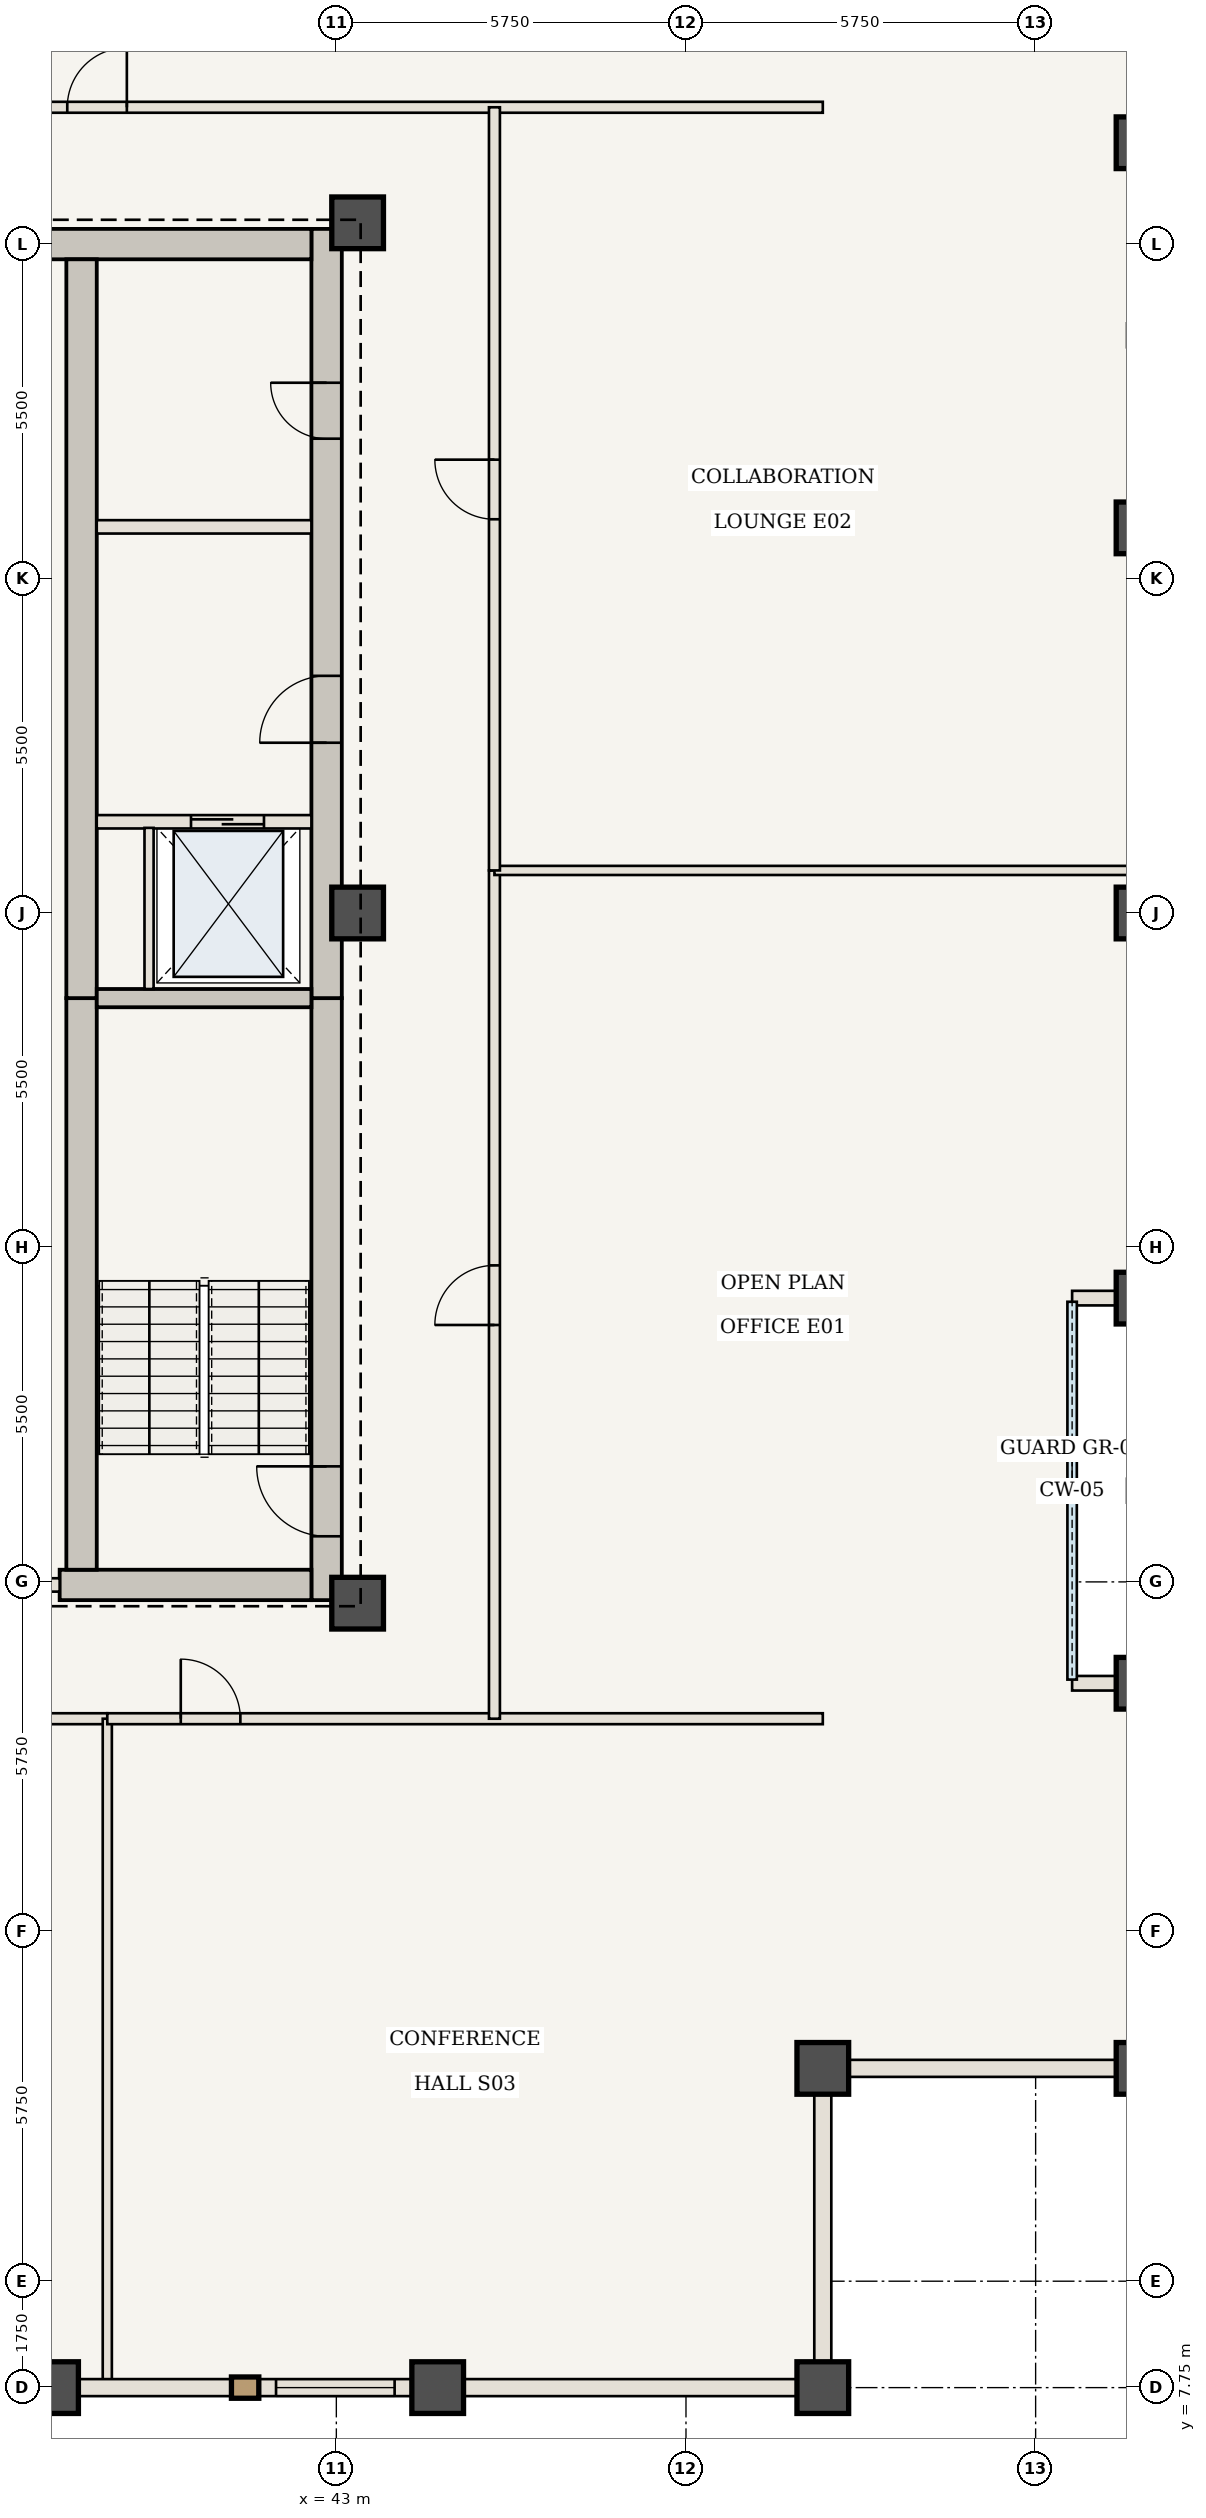
"""IFC4 building model, lengths in metres.
Left out: names, types, materials, properties, quantities, classifications, styles, units other than length and angle.
Written with IfcOpenShell. Run it as: python <this file> out.ifc"""

import sys

from ifc_helpers import new_model, si_unit, direction, frame, frame_2d, origin, origin_2d, place, context, subcontext, project, spatial, rectangle, extrude, element, fill, save


model = new_model("IFC4")
c1 = context("Model", 3, precision=1e-05, world=origin(), true_north=direction((0.0, 1.0)))
c2 = subcontext(c1, "Body", "Model", "MODEL_VIEW")
j1 = project(units=[si_unit("LENGTHUNIT", "METRE"), si_unit("PLANEANGLEUNIT", "RADIAN")], contexts=[c1])
p1 = place(None, origin())
s1 = spatial("IfcSite", under=j1, at=p1, CompositionType="ELEMENT")
p2 = place(p1, origin())
s2 = spatial("IfcBuilding", under=s1, at=p2, CompositionType="ELEMENT")
p3 = place(p2, frame((0.0, 0.0, 240.8)))
s3 = spatial("IfcBuildingStorey", under=s2, at=p3, CompositionType="ELEMENT", Elevation=240.8)
p4 = place(p3, frame((42.84, 20.7, 0.0), z_axis=(0.0, 0.0, 1.0), x_axis=(0.0, 1.0, 0.0)))
e1 = element("IfcWall", 1, at=p4, inside=s3, PredefinedType="SHEAR", context=c2, shape_type="SweptSolid", body=[
    extrude(rectangle(XDim=9.9, YDim=0.5, at=frame_2d((4.95, 0.0))), origin(), (0.0, 0.0, 1.0), 3.85),
])
p5 = place(p4, frame((1.05, 0.0, 0.0)))
e2 = element("IfcOpeningElement", 2, at=p5, cuts=e1, PredefinedType="OPENING", context=c2, shape_type="SweptSolid", body=[
    extrude(rectangle(XDim=1.15, YDim=2.15, at=frame_2d((0.575, 1.075))), frame((0.0, 0.26, 0.0), z_axis=(0.0, -1.0, 0.0), x_axis=(1.0, 0.0, 0.0)), (0.0, 0.0, 1.0), 0.52),
])
p6 = place(p3, frame((42.84, 30.6, 0.0), z_axis=(0.0, 0.0, 1.0), x_axis=(0.0, 1.0, 0.0)))
e3 = element("IfcWall", 3, at=p6, inside=s3, PredefinedType="SHEAR", context=c2, shape_type="SweptSolid", body=[
    extrude(rectangle(XDim=12.65, YDim=0.5, at=frame_2d((6.325, 0.0))), origin(), (0.0, 0.0, 1.0), 3.85),
])
p7 = place(p6, frame((4.2, 0.0, 0.0)))
e4 = element("IfcOpeningElement", 4, at=p7, cuts=e3, PredefinedType="OPENING", context=c2, shape_type="SweptSolid", body=[
    extrude(rectangle(XDim=1.1, YDim=2.15, at=frame_2d((0.55, 1.075))), frame((0.0, 0.26, 0.0), z_axis=(0.0, -1.0, 0.0), x_axis=(1.0, 0.0, 0.0)), (0.0, 0.0, 1.0), 0.52),
])
p8 = place(p6, frame((9.2, 0.0, 0.0)))
e5 = element("IfcOpeningElement", 5, at=p8, cuts=e3, PredefinedType="OPENING", context=c2, shape_type="SweptSolid", body=[
    extrude(rectangle(XDim=0.92, YDim=2.1, at=frame_2d((0.46, 1.05))), frame((0.0, 0.26, 0.0), z_axis=(0.0, -1.0, 0.0), x_axis=(1.0, 0.0, 0.0)), (0.0, 0.0, 1.0), 0.52),
])
p9 = place(p3, frame((38.45, 20.95, 0.0), z_axis=(0.0, 0.0, 1.0), x_axis=(1.0, 0.0, 0.0)))
e6 = element("IfcWall", 6, at=p9, inside=s3, PredefinedType="SHEAR", context=c2, shape_type="SweptSolid", body=[
    extrude(rectangle(XDim=4.14, YDim=0.5, at=frame_2d((2.07, 0.0))), origin(), (0.0, 0.0, 1.0), 3.85),
])
p10 = place(p3, frame((37.75, 43.0, 0.0), z_axis=(0.0, 0.0, 1.0), x_axis=(1.0, 0.0, 0.0)))
e7 = element("IfcWall", 7, at=p10, inside=s3, PredefinedType="SHEAR", context=c2, shape_type="SweptSolid", body=[
    extrude(rectangle(XDim=4.84, YDim=0.5, at=frame_2d((2.42, 0.0))), origin(), (0.0, 0.0, 1.0), 3.85),
])
p11 = place(p3, frame((38.81, 21.2, 0.0), z_axis=(0.0, 0.0, 1.0), x_axis=(0.0, 1.0, 0.0)))
e8 = element("IfcWall", 8, at=p11, inside=s3, PredefinedType="SHEAR", context=c2, shape_type="SweptSolid", body=[
    extrude(rectangle(XDim=9.4, YDim=0.5, at=frame_2d((4.7, 0.0))), origin(), (0.0, 0.0, 1.0), 3.85),
])
p12 = place(p3, frame((38.81, 30.6, 0.0), z_axis=(0.0, 0.0, 1.0), x_axis=(0.0, 1.0, 0.0)))
e9 = element("IfcWall", 9, at=p12, inside=s3, PredefinedType="SHEAR", context=c2, shape_type="SweptSolid", body=[
    extrude(rectangle(XDim=12.15, YDim=0.5, at=frame_2d((6.075, 0.0))), origin(), (0.0, 0.0, 1.0), 3.85),
])
for number, where, z_axis, x_axis in (
    (10, (43.35, 20.65, 0.0), (0.0, 0.0, 1.0), (1.0, 0.0, 0.0)),
    (11, (43.35, 32.0, 0.0), (0.0, 0.0, 1.0), (1.0, 0.0, 0.0)),
    (12, (43.35, 43.35, 0.0), (0.0, 0.0, 1.0), (1.0, 0.0, 0.0)),
    (13, (51.0, 7.75, 0.0), (0.0, 0.0, 1.0), (1.0, 0.0, 0.0)),
    (14, (51.0, 13.0, 0.0), (0.0, 0.0, 1.0), (1.0, 0.0, 0.0)),
    (15, (56.25, 13.0, 0.0), (0.0, 0.0, 1.0), (1.0, 0.0, 0.0)),
    (16, (56.25, 19.333, 0.0), (0.0, 0.0, 1.0), (1.0, 0.0, 0.0)),
    (17, (56.25, 25.667, 0.0), (0.0, 0.0, 1.0), (1.0, 0.0, 0.0)),
    (18, (56.25, 32.0, 0.0), (0.0, 0.0, 1.0), (1.0, 0.0, 0.0)),
    (19, (38.333, 7.75, 0.0), (0.0, 0.0, 1.0), (1.0, 0.0, 0.0)),
    (20, (56.25, 38.333, 0.0), (0.0, 0.0, 1.0), (1.0, 0.0, 0.0)),
    (21, (44.667, 7.75, 0.0), (0.0, 0.0, 1.0), (1.0, 0.0, 0.0)),
    (22, (56.25, 44.667, 0.0), (0.0, 0.0, 1.0), (1.0, 0.0, 0.0)),
):
    element("IfcColumn", number, at=place(p3, frame(where, z_axis=z_axis, x_axis=x_axis)), inside=s3, PredefinedType="COLUMN", context=c2, shape_type="SweptSolid", body=[
        extrude(rectangle(XDim=0.85, YDim=0.85, at=origin_2d()), origin(), (0.0, 0.0, 1.0), 3.85),
    ])
p13 = place(p3, frame((39.06, 30.6, 0.0), z_axis=(0.0, 0.0, 1.0), x_axis=(1.0, 0.0, 0.0)))
e23 = element("IfcWall", 23, at=p13, inside=s3, PredefinedType="SHEAR", context=c2, shape_type="SweptSolid", body=[
    extrude(rectangle(XDim=3.53, YDim=0.3, at=frame_2d((1.765, 0.0))), origin(), (0.0, 0.0, 1.0), 3.685),
])
p14 = place(p3, frame((39.06, 33.5, 0.0), z_axis=(0.0, 0.0, 1.0), x_axis=(1.0, 0.0, 0.0)))
e24 = element("IfcWall", 24, at=p14, inside=s3, PredefinedType="STANDARD", context=c2, shape_type="SweptSolid", body=[
    extrude(rectangle(XDim=3.53, YDim=0.22, at=frame_2d((1.765, 0.0))), origin(), (0.0, 0.0, 1.0), 3.685),
])
p15 = place(p14, frame((1.55, 0.0, 0.0)))
e25 = element("IfcOpeningElement", 25, at=p15, cuts=e24, PredefinedType="OPENING", context=c2, shape_type="SweptSolid", body=[
    extrude(rectangle(XDim=1.2, YDim=2.2, at=frame_2d((0.6, 1.1))), frame((0.0, 0.12, 0.0), z_axis=(0.0, -1.0, 0.0), x_axis=(1.0, 0.0, 0.0)), (0.0, 0.0, 1.0), 0.24),
])
p16 = place(p3, frame((39.92, 30.75, 0.0), z_axis=(0.0, 0.0, 1.0), x_axis=(0.0, 1.0, 0.0)))
e26 = element("IfcWall", 26, at=p16, inside=s3, PredefinedType="STANDARD", context=c2, shape_type="SweptSolid", body=[
    extrude(rectangle(XDim=2.65, YDim=0.15, at=frame_2d((1.325, 0.0))), origin(), (0.0, 0.0, 1.0), 3.685),
])
p17 = place(p3, frame((39.06, 38.35, 0.0), z_axis=(0.0, 0.0, 1.0), x_axis=(1.0, 0.0, 0.0)))
e27 = element("IfcWall", 27, at=p17, inside=s3, PredefinedType="STANDARD", context=c2, shape_type="SweptSolid", body=[
    extrude(rectangle(XDim=3.53, YDim=0.22, at=frame_2d((1.765, 0.0))), origin(), (0.0, 0.0, 1.0), 3.685),
])
p18 = place(p3, frame((35.15, 20.95, 0.0), z_axis=(0.0, 0.0, 1.0), x_axis=(1.0, 0.0, 0.0)))
e28 = element("IfcWall", 28, at=p18, inside=s3, PredefinedType="STANDARD", context=c2, shape_type="SweptSolid", body=[
    extrude(rectangle(XDim=3.3, YDim=0.22, at=frame_2d((1.65, 0.0))), origin(), (0.0, 0.0, 1.0), 3.685),
])
p19 = place(p18, frame((1.1, 0.0, 0.0)))
e29 = element("IfcOpeningElement", 29, at=p19, cuts=e28, PredefinedType="OPENING", context=c2, shape_type="SweptSolid", body=[
    extrude(rectangle(XDim=1.1, YDim=2.15, at=frame_2d((0.55, 1.075))), frame((0.0, 0.12, 0.0), z_axis=(0.0, -1.0, 0.0), x_axis=(1.0, 0.0, 0.0)), (0.0, 0.0, 1.0), 0.24),
])
p20 = place(p3, frame((24.867, 18.75, 0.0), z_axis=(0.0, 0.0, 1.0), x_axis=(1.0, 0.0, 0.0)))
e30 = element("IfcWall", 30, at=p20, inside=s3, PredefinedType="STANDARD", context=c2, shape_type="SweptSolid", body=[
    extrude(rectangle(XDim=14.367, YDim=0.18, at=frame_2d((7.183, 0.0))), origin(), (0.0, 0.0, 1.0), 3.685),
])
p21 = place(p20, frame((8.133, 0.0, 0.0)))
e31 = element("IfcOpeningElement", 31, at=p21, cuts=e30, PredefinedType="OPENING", context=c2, shape_type="SweptSolid", body=[
    extrude(rectangle(XDim=0.98, YDim=2.2, at=frame_2d((0.49, 1.1))), frame((0.0, 0.1, 0.0), z_axis=(0.0, -1.0, 0.0), x_axis=(1.0, 0.0, 0.0)), (0.0, 0.0, 1.0), 0.2),
])
p22 = place(p3, frame((39.233, 7.81, 0.0), z_axis=(0.0, 0.0, 1.0), x_axis=(0.0, 1.0, 0.0)))
e32 = element("IfcWall", 32, at=p22, inside=s3, PredefinedType="STANDARD", context=c2, shape_type="SweptSolid", body=[
    extrude(rectangle(XDim=10.94, YDim=0.15, at=frame_2d((5.47, 0.0))), origin(), (0.0, 0.0, 1.0), 3.685),
])
p23 = place(p3, frame((39.233, 18.75, 0.0), z_axis=(0.0, 0.0, 1.0), x_axis=(1.0, 0.0, 0.0)))
e33 = element("IfcWall", 33, at=p23, inside=s3, PredefinedType="STANDARD", context=c2, shape_type="SweptSolid", body=[
    extrude(rectangle(XDim=11.767, YDim=0.18, at=frame_2d((5.883, 0.0))), origin(), (0.0, 0.0, 1.0), 3.685),
])
p24 = place(p23, frame((1.208, 0.0, 0.0)))
e34 = element("IfcOpeningElement", 34, at=p24, cuts=e33, PredefinedType="OPENING", context=c2, shape_type="SweptSolid", body=[
    extrude(rectangle(XDim=0.98, YDim=2.2, at=frame_2d((0.49, 1.1))), frame((0.0, 0.1, 0.0), z_axis=(0.0, -1.0, 0.0), x_axis=(1.0, 0.0, 0.0)), (0.0, 0.0, 1.0), 0.2),
])
p25 = place(p3, frame((32.6, 45.25, 0.0), z_axis=(0.0, 0.0, 1.0), x_axis=(1.0, 0.0, 0.0)))
e35 = element("IfcWall", 35, at=p25, inside=s3, PredefinedType="STANDARD", context=c2, shape_type="SweptSolid", body=[
    extrude(rectangle(XDim=18.4, YDim=0.18, at=frame_2d((9.2, 0.0))), origin(), (0.0, 0.0, 1.0), 3.685),
])
p26 = place(p25, frame((5.975, 0.0, 0.0)))
e36 = element("IfcOpeningElement", 36, at=p26, cuts=e35, PredefinedType="OPENING", context=c2, shape_type="SweptSolid", body=[
    extrude(rectangle(XDim=0.98, YDim=2.2, at=frame_2d((0.49, 1.1))), frame((0.0, 0.1, 0.0), z_axis=(0.0, -1.0, 0.0), x_axis=(1.0, 0.0, 0.0)), (0.0, 0.0, 1.0), 0.2),
])
p27 = place(p3, frame((45.6, 18.75, 0.0), z_axis=(0.0, 0.0, 1.0), x_axis=(0.0, 1.0, 0.0)))
e37 = element("IfcWall", 37, at=p27, inside=s3, PredefinedType="STANDARD", context=c2, shape_type="SweptSolid", body=[
    extrude(rectangle(XDim=13.95, YDim=0.18, at=frame_2d((6.975, 0.0))), origin(), (0.0, 0.0, 1.0), 3.685),
])
p28 = place(p27, frame((6.475, 0.0, 0.0)))
e38 = element("IfcOpeningElement", 38, at=p28, cuts=e37, PredefinedType="OPENING", context=c2, shape_type="SweptSolid", body=[
    extrude(rectangle(XDim=0.98, YDim=2.2, at=frame_2d((0.49, 1.1))), frame((0.0, 0.1, 0.0), z_axis=(0.0, -1.0, 0.0), x_axis=(1.0, 0.0, 0.0)), (0.0, 0.0, 1.0), 0.2),
])
p29 = place(p3, frame((45.6, 32.7, 0.0), z_axis=(0.0, 0.0, 1.0), x_axis=(1.0, 0.0, 0.0)))
e39 = element("IfcWall", 39, at=p29, inside=s3, PredefinedType="STANDARD", context=c2, shape_type="SweptSolid", body=[
    extrude(rectangle(XDim=10.59, YDim=0.15, at=frame_2d((5.295, 0.0))), origin(), (0.0, 0.0, 1.0), 3.685),
])
p30 = place(p3, frame((45.6, 32.7, 0.0), z_axis=(0.0, 0.0, 1.0), x_axis=(0.0, 1.0, 0.0)))
e40 = element("IfcWall", 40, at=p30, inside=s3, PredefinedType="STANDARD", context=c2, shape_type="SweptSolid", body=[
    extrude(rectangle(XDim=12.55, YDim=0.18, at=frame_2d((6.275, 0.0))), origin(), (0.0, 0.0, 1.0), 3.685),
])
p31 = place(p30, frame((5.775, 0.0, 0.0)))
e41 = element("IfcOpeningElement", 41, at=p31, cuts=e40, PredefinedType="OPENING", context=c2, shape_type="SweptSolid", body=[
    extrude(rectangle(XDim=0.98, YDim=2.2, at=frame_2d((0.49, 1.1))), frame((0.0, 0.1, 0.0), z_axis=(0.0, -1.0, 0.0), x_axis=(1.0, 0.0, 0.0)), (0.0, 0.0, 1.0), 0.2),
])
p32 = place(p3, frame((38.333, 7.75, 0.0), z_axis=(0.0, 0.0, 1.0), x_axis=(-1.0, 0.0, 0.0)))
e42 = element("IfcWall", 42, at=p32, inside=s3, PredefinedType="USERDEFINED", context=c2, shape_type="SweptSolid", body=[
    extrude(rectangle(XDim=6.333, YDim=0.28, at=frame_2d((3.167, 0.0))), origin(), (0.0, 0.0, 1.0), 2.985),
])
p33 = place(p32, frame((1.817, 0.0, 0.85)))
e43 = element("IfcOpeningElement", 43, at=p33, cuts=e42, PredefinedType="OPENING", context=c2, shape_type="SweptSolid", body=[
    extrude(rectangle(XDim=2.7, YDim=1.935, at=frame_2d((1.35, 0.968))), frame((0.0, 0.15, 0.0), z_axis=(0.0, -1.0, 0.0), x_axis=(1.0, 0.0, 0.0)), (0.0, 0.0, 1.0), 0.3),
])
p34 = place(p3, frame((44.667, 7.75, 0.0), z_axis=(0.0, 0.0, 1.0), x_axis=(-1.0, 0.0, 0.0)))
e44 = element("IfcWall", 44, at=p34, inside=s3, PredefinedType="USERDEFINED", context=c2, shape_type="SweptSolid", body=[
    extrude(rectangle(XDim=6.333, YDim=0.28, at=frame_2d((3.167, 0.0))), origin(), (0.0, 0.0, 1.0), 2.985),
])
p35 = place(p34, frame((0.708, 0.0, 0.85)))
e45 = element("IfcOpeningElement", 45, at=p35, cuts=e44, PredefinedType="OPENING", context=c2, shape_type="SweptSolid", body=[
    extrude(rectangle(XDim=1.95, YDim=1.935, at=frame_2d((0.975, 0.968))), frame((0.0, 0.15, 0.0), z_axis=(0.0, -1.0, 0.0), x_axis=(1.0, 0.0, 0.0)), (0.0, 0.0, 1.0), 0.3),
])
p36 = place(p3, frame((51.0, 7.75, 0.0), z_axis=(0.0, 0.0, 1.0), x_axis=(-1.0, 0.0, 0.0)))
e46 = element("IfcWall", 46, at=p36, inside=s3, PredefinedType="USERDEFINED", context=c2, shape_type="SweptSolid", body=[
    extrude(rectangle(XDim=6.333, YDim=0.28, at=frame_2d((3.167, 0.0))), origin(), (0.0, 0.0, 1.0), 2.985),
])
for number, where, z_axis, x_axis in (
    (47, (56.25, 19.333, 0.0), (0.0, 0.0, 1.0), (-1.0, 0.0, 0.0)),
    (48, (56.25, 25.667, 0.0), (0.0, 0.0, 1.0), (-1.0, 0.0, 0.0)),
):
    element("IfcWall", number, at=place(p3, frame(where, z_axis=z_axis, x_axis=x_axis)), inside=s3, PredefinedType="USERDEFINED", context=c2, shape_type="SweptSolid", body=[
        extrude(rectangle(XDim=1.15, YDim=0.24, at=frame_2d((0.575, 0.0))), origin(), (0.0, 0.0, 1.0), 2.985),
    ])
for number, where, z_axis, x_axis in (
    (49, (51.0, 13.0, 0.0), (0.0, 0.0, 1.0), (0.0, -1.0, 0.0)),
    (50, (56.25, 13.0, 0.0), (0.0, 0.0, 1.0), (-1.0, 0.0, 0.0)),
):
    element("IfcWall", number, at=place(p3, frame(where, z_axis=z_axis, x_axis=x_axis)), inside=s3, PredefinedType="USERDEFINED", context=c2, shape_type="SweptSolid", body=[
        extrude(rectangle(XDim=5.25, YDim=0.28, at=frame_2d((2.625, 0.0))), origin(), (0.0, 0.0, 1.0), 2.985),
    ])
p37 = place(p5, origin())
e51 = element("IfcDoor", 51, at=p37, inside=s3, OperationType="SINGLE_SWING_RIGHT", PredefinedType="DOOR", context=c2, shape_type="SweptSolid", body=[
    extrude(rectangle(XDim=1.15, YDim=2.15, at=frame_2d((0.575, 1.075))), frame((0.0, 0.025, 0.0), z_axis=(0.0, -1.0, 0.0), x_axis=(1.0, 0.0, 0.0)), (0.0, 0.0, 1.0), 0.05),
])
fill(e2, e51)
p38 = place(p7, origin())
e52 = element("IfcDoor", 52, at=p38, inside=s3, OperationType="SINGLE_SWING_LEFT", PredefinedType="DOOR", context=c2, shape_type="SweptSolid", body=[
    extrude(rectangle(XDim=1.1, YDim=2.15, at=frame_2d((0.55, 1.075))), frame((0.0, 0.025, 0.0), z_axis=(0.0, -1.0, 0.0), x_axis=(1.0, 0.0, 0.0)), (0.0, 0.0, 1.0), 0.05),
])
fill(e4, e52)
p39 = place(p8, origin())
e53 = element("IfcDoor", 53, at=p39, inside=s3, OperationType="SINGLE_SWING_RIGHT", PredefinedType="DOOR", context=c2, shape_type="SweptSolid", body=[
    extrude(rectangle(XDim=0.92, YDim=2.1, at=frame_2d((0.46, 1.05))), frame((0.0, 0.025, 0.0), z_axis=(0.0, -1.0, 0.0), x_axis=(1.0, 0.0, 0.0)), (0.0, 0.0, 1.0), 0.05),
])
fill(e5, e53)
p40 = place(p15, origin())
e54 = element("IfcDoor", 54, at=p40, inside=s3, OperationType="DOUBLE_DOOR_SLIDING", PredefinedType="DOOR", context=c2, shape_type="SweptSolid", body=[
    extrude(rectangle(XDim=1.2, YDim=2.2, at=frame_2d((0.6, 1.1))), frame((0.0, 0.025, 0.0), z_axis=(0.0, -1.0, 0.0), x_axis=(1.0, 0.0, 0.0)), (0.0, 0.0, 1.0), 0.05),
])
fill(e25, e54)
p41 = place(p24, origin())
e55 = element("IfcDoor", 55, at=p41, inside=s3, OperationType="SINGLE_SWING_LEFT", PredefinedType="DOOR", context=c2, shape_type="SweptSolid", body=[
    extrude(rectangle(XDim=0.98, YDim=2.2, at=frame_2d((0.49, 1.1))), frame((0.0, 0.025, 0.0), z_axis=(0.0, -1.0, 0.0), x_axis=(1.0, 0.0, 0.0)), (0.0, 0.0, 1.0), 0.05),
])
fill(e34, e55)
p42 = place(p26, origin())
e56 = element("IfcDoor", 56, at=p42, inside=s3, OperationType="SINGLE_SWING_RIGHT", PredefinedType="DOOR", context=c2, shape_type="SweptSolid", body=[
    extrude(rectangle(XDim=0.98, YDim=2.2, at=frame_2d((0.49, 1.1))), frame((0.0, 0.025, 0.0), z_axis=(0.0, -1.0, 0.0), x_axis=(1.0, 0.0, 0.0)), (0.0, 0.0, 1.0), 0.05),
])
fill(e36, e56)
p43 = place(p28, origin())
e57 = element("IfcDoor", 57, at=p43, inside=s3, OperationType="SINGLE_SWING_LEFT", PredefinedType="DOOR", context=c2, shape_type="SweptSolid", body=[
    extrude(rectangle(XDim=0.98, YDim=2.2, at=frame_2d((0.49, 1.1))), frame((0.0, 0.025, 0.0), z_axis=(0.0, -1.0, 0.0), x_axis=(1.0, 0.0, 0.0)), (0.0, 0.0, 1.0), 0.05),
])
fill(e38, e57)
p44 = place(p31, origin())
e58 = element("IfcDoor", 58, at=p44, inside=s3, OperationType="SINGLE_SWING_RIGHT", PredefinedType="DOOR", context=c2, shape_type="SweptSolid", body=[
    extrude(rectangle(XDim=0.98, YDim=2.2, at=frame_2d((0.49, 1.1))), frame((0.0, 0.025, 0.0), z_axis=(0.0, -1.0, 0.0), x_axis=(1.0, 0.0, 0.0)), (0.0, 0.0, 1.0), 0.05),
])
fill(e41, e58)
p45 = place(p35, origin())
e59 = element("IfcWindow", 59, at=p45, inside=s3, PartitioningType="SINGLE_PANEL", PredefinedType="WINDOW", context=c2, shape_type="SweptSolid", body=[
    extrude(rectangle(XDim=1.95, YDim=1.935, at=frame_2d((0.975, 0.968))), frame((0.0, 0.03, 0.0), z_axis=(0.0, -1.0, 0.0), x_axis=(1.0, 0.0, 0.0)), (0.0, 0.0, 1.0), 0.06),
])
fill(e45, e59)
save(model, sys.argv[1])
